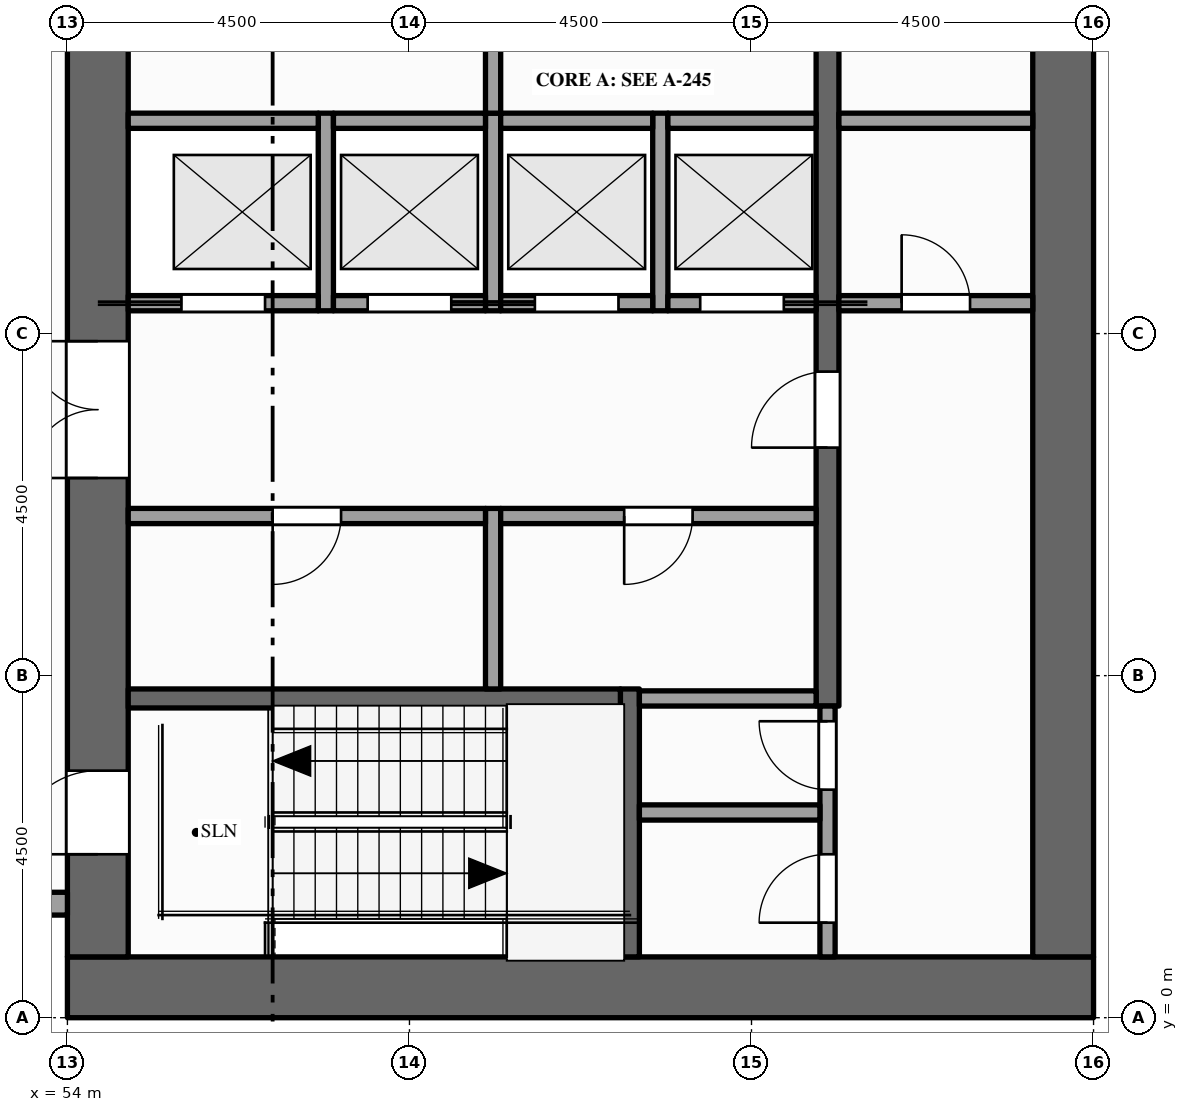
"""IFC4 building model, lengths in metres.
Left out: names, types, materials, properties, quantities, classifications, styles, units other than length and angle.
Written with IfcOpenShell. Run it as: python <this file> out.ifc"""

import sys

from ifc_helpers import new_model, si_unit, direction, frame, frame_2d, origin, place, context, subcontext, project, spatial, rectangle, extrude, element, fill, save


model = new_model("IFC4")
c1 = context("Model", 3, precision=1e-05, world=origin(), true_north=direction((0.0, 1.0)))
c2 = subcontext(c1, "Body", "Model", "MODEL_VIEW")
j1 = project(units=[si_unit("LENGTHUNIT", "METRE"), si_unit("PLANEANGLEUNIT", "RADIAN")], contexts=[c1])
p1 = place(None, origin())
s1 = spatial("IfcSite", under=j1, at=p1, CompositionType="ELEMENT")
p2 = place(p1, origin())
s2 = spatial("IfcBuilding", under=s1, at=p2, CompositionType="ELEMENT")
p3 = place(p2, frame((0.0, 0.0, 249.0)))
s3 = spatial("IfcBuildingStorey", under=s2, at=p3, CompositionType="ELEMENT", Elevation=249.0)
p4 = place(p3, frame((67.5, 0.4, -0.15), z_axis=(0.0, 0.0, 1.0), x_axis=(-1.0, 0.0, 0.0)))
e1 = element("IfcWall", 1, at=p4, inside=s3, PredefinedType="SHEAR", context=c2, shape_type="SweptSolid", body=[
    extrude(rectangle(XDim=13.5, YDim=0.8, at=frame_2d((6.75, 0.0))), origin(), (0.0, 0.0, 1.0), 4.0),
])
p5 = place(p3, frame((54.4, 0.8, -0.15), z_axis=(0.0, 0.0, 1.0), x_axis=(0.0, 1.0, 0.0)))
e2 = element("IfcWall", 2, at=p5, inside=s3, PredefinedType="SHEAR", context=c2, shape_type="SweptSolid", body=[
    extrude(rectangle(XDim=20.9, YDim=0.8, at=frame_2d((10.45, 0.0))), origin(), (0.0, 0.0, 1.0), 4.0),
])
p6 = place(p5, frame((6.3, 0.0, 0.15)))
e3 = element("IfcOpeningElement", 3, at=p6, cuts=e2, PredefinedType="OPENING", context=c2, shape_type="SweptSolid", body=[
    extrude(rectangle(XDim=1.8, YDim=2.1, at=frame_2d((0.9, 1.05))), frame((0.0, 0.41, 0.0), z_axis=(0.0, -1.0, 0.0), x_axis=(1.0, 0.0, 0.0)), (0.0, 0.0, 1.0), 0.82),
])
p7 = place(p5, frame((12.35, 0.0, 0.15)))
e4 = element("IfcOpeningElement", 4, at=p7, cuts=e2, PredefinedType="OPENING", context=c2, shape_type="SweptSolid", body=[
    extrude(rectangle(XDim=1.1, YDim=2.1, at=frame_2d((0.55, 1.05))), frame((0.0, 0.41, 0.0), z_axis=(0.0, -1.0, 0.0), x_axis=(1.0, 0.0, 0.0)), (0.0, 0.0, 1.0), 0.82),
])
p8 = place(p5, frame((1.35, 0.0, 0.15)))
e5 = element("IfcOpeningElement", 5, at=p8, cuts=e2, PredefinedType="OPENING", context=c2, shape_type="SweptSolid", body=[
    extrude(rectangle(XDim=1.1, YDim=2.1, at=frame_2d((0.55, 1.05))), frame((0.0, 0.41, 0.0), z_axis=(0.0, -1.0, 0.0), x_axis=(1.0, 0.0, 0.0)), (0.0, 0.0, 1.0), 0.82),
])
p9 = place(p5, frame((18.55, 0.0, 0.15)))
e6 = element("IfcOpeningElement", 6, at=p9, cuts=e2, PredefinedType="OPENING", context=c2, shape_type="SweptSolid", body=[
    extrude(rectangle(XDim=1.1, YDim=2.1, at=frame_2d((0.55, 1.05))), frame((0.0, 0.41, 0.0), z_axis=(0.0, -1.0, 0.0), x_axis=(1.0, 0.0, 0.0)), (0.0, 0.0, 1.0), 0.82),
])
p10 = place(p3, frame((67.1, 0.8, -0.15), z_axis=(0.0, 0.0, 1.0), x_axis=(0.0, 1.0, 0.0)))
e7 = element("IfcWall", 7, at=p10, inside=s3, PredefinedType="SHEAR", context=c2, shape_type="SweptSolid", body=[
    extrude(rectangle(XDim=20.9, YDim=0.8, at=frame_2d((10.45, 0.0))), origin(), (0.0, 0.0, 1.0), 4.0),
])
p11 = place(p3, frame((49.825, 1.5, 0.0), z_axis=(0.0, 0.0, 1.0), x_axis=(1.0, 0.0, 0.0)))
e8 = element("IfcWall", 8, at=p11, inside=s3, PredefinedType="STANDARD", context=c2, shape_type="SweptSolid", body=[
    extrude(rectangle(XDim=4.175, YDim=0.3, at=frame_2d((2.087, 0.0))), origin(), (0.0, 0.0, 1.0), 2.87),
])
p12 = place(p11, frame((0.413, 0.0, 0.9)))
e9 = element("IfcOpeningElement", 9, at=p12, cuts=e8, PredefinedType="OPENING", context=c2, shape_type="SweptSolid", body=[
    extrude(rectangle(XDim=1.2, YDim=1.75, at=frame_2d((0.6, 0.875))), frame((0.0, 0.16, 0.0), z_axis=(0.0, -1.0, 0.0), x_axis=(1.0, 0.0, 0.0)), (0.0, 0.0, 1.0), 0.32),
])
p13 = place(p11, frame((2.225, 0.0, 0.9)))
e10 = element("IfcOpeningElement", 10, at=p13, cuts=e8, PredefinedType="OPENING", context=c2, shape_type="SweptSolid", body=[
    extrude(rectangle(XDim=1.55, YDim=1.75, at=frame_2d((0.775, 0.875))), frame((0.0, 0.16, 0.0), z_axis=(0.0, -1.0, 0.0), x_axis=(1.0, 0.0, 0.0)), (0.0, 0.0, 1.0), 0.32),
])
p14 = place(p3, frame((57.4, 9.3, 0.0), z_axis=(0.0, 0.0, 1.0), x_axis=(0.0, 1.0, 0.0)))
e11 = element("IfcWall", 11, at=p14, inside=s3, PredefinedType="SOLIDWALL", context=c2, shape_type="SweptSolid", body=[
    extrude(rectangle(XDim=2.6, YDim=0.2, at=frame_2d((1.3, 0.0))), origin(), (0.0, 0.0, 1.0), 3.85),
])
p15 = place(p3, frame((59.6, 4.325, 0.0), z_axis=(0.0, 0.0, 1.0), x_axis=(0.0, 1.0, 0.0)))
e12 = element("IfcWall", 12, at=p15, inside=s3, PredefinedType="PARTITIONING", context=c2, shape_type="SweptSolid", body=[
    extrude(rectangle(XDim=2.375, YDim=0.2, at=frame_2d((1.188, 0.0))), origin(), (0.0, 0.0, 1.0), 3.85),
])
p16 = place(p3, frame((59.6, 9.3, 0.0), z_axis=(0.0, 0.0, 1.0), x_axis=(0.0, 1.0, 0.0)))
e13 = element("IfcWall", 13, at=p16, inside=s3, PredefinedType="SOLIDWALL", context=c2, shape_type="SweptSolid", body=[
    extrude(rectangle(XDim=2.6, YDim=0.2, at=frame_2d((1.3, 0.0))), origin(), (0.0, 0.0, 1.0), 3.85),
])
p17 = place(p3, frame((59.6, 11.9, 0.0), z_axis=(0.0, 0.0, 1.0), x_axis=(0.0, 1.0, 0.0)))
e14 = element("IfcWall", 14, at=p17, inside=s3, PredefinedType="PARTITIONING", context=c2, shape_type="SweptSolid", body=[
    extrude(rectangle(XDim=3.6, YDim=0.2, at=frame_2d((1.8, 0.0))), origin(), (0.0, 0.0, 1.0), 3.85),
])
p18 = place(p17, frame((1.3, 0.0, 0.0)))
e15 = element("IfcOpeningElement", 15, at=p18, cuts=e14, PredefinedType="OPENING", context=c2, shape_type="SweptSolid", body=[
    extrude(rectangle(XDim=1.0, YDim=2.1, at=frame_2d((0.5, 1.05))), frame((0.0, 0.11, 0.0), z_axis=(0.0, -1.0, 0.0), x_axis=(1.0, 0.0, 0.0)), (0.0, 0.0, 1.0), 0.22),
])
p19 = place(p3, frame((61.4, 0.8, 0.0), z_axis=(0.0, 0.0, 1.0), x_axis=(0.0, 1.0, 0.0)))
e16 = element("IfcWall", 16, at=p19, inside=s3, PredefinedType="SHEAR", context=c2, shape_type="SweptSolid", body=[
    extrude(rectangle(XDim=3.525, YDim=0.25, at=frame_2d((1.762, 0.0))), origin(), (0.0, 0.0, 1.0), 3.85),
])
p20 = place(p3, frame((61.8, 9.3, 0.0), z_axis=(0.0, 0.0, 1.0), x_axis=(0.0, 1.0, 0.0)))
e17 = element("IfcWall", 17, at=p20, inside=s3, PredefinedType="SOLIDWALL", context=c2, shape_type="SweptSolid", body=[
    extrude(rectangle(XDim=2.6, YDim=0.2, at=frame_2d((1.3, 0.0))), origin(), (0.0, 0.0, 1.0), 3.85),
])
p21 = place(p3, frame((64.0, 0.8, 0.0), z_axis=(0.0, 0.0, 1.0), x_axis=(0.0, 1.0, 0.0)))
e18 = element("IfcWall", 18, at=p21, inside=s3, PredefinedType="PARTITIONING", context=c2, shape_type="SweptSolid", body=[
    extrude(rectangle(XDim=3.3, YDim=0.2, at=frame_2d((1.65, 0.0))), origin(), (0.0, 0.0, 1.0), 3.85),
])
p22 = place(p21, frame((0.45, 0.0, 0.0)))
e19 = element("IfcOpeningElement", 19, at=p22, cuts=e18, PredefinedType="OPENING", context=c2, shape_type="SweptSolid", body=[
    extrude(rectangle(XDim=0.9, YDim=2.1, at=frame_2d((0.45, 1.05))), frame((0.0, 0.11, 0.0), z_axis=(0.0, -1.0, 0.0), x_axis=(1.0, 0.0, 0.0)), (0.0, 0.0, 1.0), 0.22),
])
p23 = place(p21, frame((2.2, 0.0, 0.0)))
e20 = element("IfcOpeningElement", 20, at=p23, cuts=e18, PredefinedType="OPENING", context=c2, shape_type="SweptSolid", body=[
    extrude(rectangle(XDim=0.9, YDim=2.1, at=frame_2d((0.45, 1.05))), frame((0.0, 0.11, 0.0), z_axis=(0.0, -1.0, 0.0), x_axis=(1.0, 0.0, 0.0)), (0.0, 0.0, 1.0), 0.22),
])
p24 = place(p3, frame((64.0, 4.1, 0.0), z_axis=(0.0, 0.0, 1.0), x_axis=(0.0, 1.0, 0.0)))
e21 = element("IfcWall", 21, at=p24, inside=s3, PredefinedType="SHEAR", context=c2, shape_type="SweptSolid", body=[
    extrude(rectangle(XDim=14.5, YDim=0.3, at=frame_2d((7.25, 0.0))), origin(), (0.0, 0.0, 1.0), 3.85),
])
p25 = place(p24, frame((3.4, 0.0, 0.0)))
e22 = element("IfcOpeningElement", 22, at=p25, cuts=e21, PredefinedType="OPENING", context=c2, shape_type="SweptSolid", body=[
    extrude(rectangle(XDim=1.0, YDim=2.1, at=frame_2d((0.5, 1.05))), frame((0.0, 0.16, 0.0), z_axis=(0.0, -1.0, 0.0), x_axis=(1.0, 0.0, 0.0)), (0.0, 0.0, 1.0), 0.32),
])
p26 = place(p24, frame((9.1, 0.0, 0.0)))
e23 = element("IfcOpeningElement", 23, at=p26, cuts=e21, PredefinedType="OPENING", context=c2, shape_type="SweptSolid", body=[
    extrude(rectangle(XDim=1.0, YDim=2.1, at=frame_2d((0.5, 1.05))), frame((0.0, 0.16, 0.0), z_axis=(0.0, -1.0, 0.0), x_axis=(1.0, 0.0, 0.0)), (0.0, 0.0, 1.0), 0.32),
])
p27 = place(p3, frame((61.525, 2.7, 0.0), z_axis=(0.0, 0.0, 1.0), x_axis=(1.0, 0.0, 0.0)))
e24 = element("IfcWall", 24, at=p27, inside=s3, PredefinedType="PARTITIONING", context=c2, shape_type="SweptSolid", body=[
    extrude(rectangle(XDim=2.375, YDim=0.2, at=frame_2d((1.188, 0.0))), origin(), (0.0, 0.0, 1.0), 3.85),
])
p28 = place(p3, frame((54.8, 4.2, 0.0), z_axis=(0.0, 0.0, 1.0), x_axis=(1.0, 0.0, 0.0)))
e25 = element("IfcWall", 25, at=p28, inside=s3, PredefinedType="SHEAR", context=c2, shape_type="SweptSolid", body=[
    extrude(rectangle(XDim=6.475, YDim=0.25, at=frame_2d((3.237, 0.0))), origin(), (0.0, 0.0, 1.0), 3.85),
])
p29 = place(p3, frame((61.525, 4.2, 0.0), z_axis=(0.0, 0.0, 1.0), x_axis=(1.0, 0.0, 0.0)))
e26 = element("IfcWall", 26, at=p29, inside=s3, PredefinedType="PARTITIONING", context=c2, shape_type="SweptSolid", body=[
    extrude(rectangle(XDim=2.325, YDim=0.2, at=frame_2d((1.163, 0.0))), origin(), (0.0, 0.0, 1.0), 3.85),
])
p30 = place(p3, frame((54.8, 6.6, 0.0), z_axis=(0.0, 0.0, 1.0), x_axis=(1.0, 0.0, 0.0)))
e27 = element("IfcWall", 27, at=p30, inside=s3, PredefinedType="PARTITIONING", context=c2, shape_type="SweptSolid", body=[
    extrude(rectangle(XDim=4.7, YDim=0.2, at=frame_2d((2.35, 0.0))), origin(), (0.0, 0.0, 1.0), 3.85),
])
p31 = place(p30, frame((1.9, 0.0, 0.0)))
e28 = element("IfcOpeningElement", 28, at=p31, cuts=e27, PredefinedType="OPENING", context=c2, shape_type="SweptSolid", body=[
    extrude(rectangle(XDim=0.9, YDim=2.1, at=frame_2d((0.45, 1.05))), frame((0.0, 0.11, 0.0), z_axis=(0.0, -1.0, 0.0), x_axis=(1.0, 0.0, 0.0)), (0.0, 0.0, 1.0), 0.22),
])
p32 = place(p3, frame((59.7, 6.6, 0.0), z_axis=(0.0, 0.0, 1.0), x_axis=(1.0, 0.0, 0.0)))
e29 = element("IfcWall", 29, at=p32, inside=s3, PredefinedType="PARTITIONING", context=c2, shape_type="SweptSolid", body=[
    extrude(rectangle(XDim=4.15, YDim=0.2, at=frame_2d((2.075, 0.0))), origin(), (0.0, 0.0, 1.0), 3.85),
])
p33 = place(p32, frame((1.625, 0.0, 0.0)))
e30 = element("IfcOpeningElement", 30, at=p33, cuts=e29, PredefinedType="OPENING", context=c2, shape_type="SweptSolid", body=[
    extrude(rectangle(XDim=0.9, YDim=2.1, at=frame_2d((0.45, 1.05))), frame((0.0, 0.11, 0.0), z_axis=(0.0, -1.0, 0.0), x_axis=(1.0, 0.0, 0.0)), (0.0, 0.0, 1.0), 0.22),
])
p34 = place(p3, frame((54.8, 9.4, 0.0), z_axis=(0.0, 0.0, 1.0), x_axis=(1.0, 0.0, 0.0)))
e31 = element("IfcWall", 31, at=p34, inside=s3, PredefinedType="SOLIDWALL", context=c2, shape_type="SweptSolid", body=[
    extrude(rectangle(XDim=2.5, YDim=0.2, at=frame_2d((1.25, 0.0))), origin(), (0.0, 0.0, 1.0), 3.85),
])
p35 = place(p34, frame((0.7, 0.0, 0.012)))
e32 = element("IfcOpeningElement", 32, at=p35, cuts=e31, PredefinedType="OPENING", context=c2, shape_type="SweptSolid", body=[
    extrude(rectangle(XDim=1.1, YDim=2.1, at=frame_2d((0.55, 1.05))), frame((0.0, 0.11, 0.0), z_axis=(0.0, -1.0, 0.0), x_axis=(1.0, 0.0, 0.0)), (0.0, 0.0, 1.0), 0.22),
])
p36 = place(p3, frame((57.5, 9.4, 0.0), z_axis=(0.0, 0.0, 1.0), x_axis=(1.0, 0.0, 0.0)))
e33 = element("IfcWall", 33, at=p36, inside=s3, PredefinedType="SOLIDWALL", context=c2, shape_type="SweptSolid", body=[
    extrude(rectangle(XDim=2.0, YDim=0.2, at=frame_2d((1.0, 0.0))), origin(), (0.0, 0.0, 1.0), 3.85),
])
p37 = place(p36, frame((0.45, 0.0, 0.012)))
e34 = element("IfcOpeningElement", 34, at=p37, cuts=e33, PredefinedType="OPENING", context=c2, shape_type="SweptSolid", body=[
    extrude(rectangle(XDim=1.1, YDim=2.1, at=frame_2d((0.55, 1.05))), frame((0.0, 0.11, 0.0), z_axis=(0.0, -1.0, 0.0), x_axis=(1.0, 0.0, 0.0)), (0.0, 0.0, 1.0), 0.22),
])
p38 = place(p3, frame((59.7, 9.4, 0.0), z_axis=(0.0, 0.0, 1.0), x_axis=(1.0, 0.0, 0.0)))
e35 = element("IfcWall", 35, at=p38, inside=s3, PredefinedType="SOLIDWALL", context=c2, shape_type="SweptSolid", body=[
    extrude(rectangle(XDim=2.0, YDim=0.2, at=frame_2d((1.0, 0.0))), origin(), (0.0, 0.0, 1.0), 3.85),
])
p39 = place(p38, frame((0.45, 0.0, 0.012)))
e36 = element("IfcOpeningElement", 36, at=p39, cuts=e35, PredefinedType="OPENING", context=c2, shape_type="SweptSolid", body=[
    extrude(rectangle(XDim=1.1, YDim=2.1, at=frame_2d((0.55, 1.05))), frame((0.0, 0.11, 0.0), z_axis=(0.0, -1.0, 0.0), x_axis=(1.0, 0.0, 0.0)), (0.0, 0.0, 1.0), 0.22),
])
p40 = place(p3, frame((61.9, 9.4, 0.0), z_axis=(0.0, 0.0, 1.0), x_axis=(1.0, 0.0, 0.0)))
e37 = element("IfcWall", 37, at=p40, inside=s3, PredefinedType="SOLIDWALL", context=c2, shape_type="SweptSolid", body=[
    extrude(rectangle(XDim=1.95, YDim=0.2, at=frame_2d((0.975, 0.0))), origin(), (0.0, 0.0, 1.0), 3.85),
])
p41 = place(p40, frame((0.425, 0.0, 0.012)))
e38 = element("IfcOpeningElement", 38, at=p41, cuts=e37, PredefinedType="OPENING", context=c2, shape_type="SweptSolid", body=[
    extrude(rectangle(XDim=1.1, YDim=2.1, at=frame_2d((0.55, 1.05))), frame((0.0, 0.11, 0.0), z_axis=(0.0, -1.0, 0.0), x_axis=(1.0, 0.0, 0.0)), (0.0, 0.0, 1.0), 0.22),
])
p42 = place(p3, frame((64.15, 9.4, 0.0), z_axis=(0.0, 0.0, 1.0), x_axis=(1.0, 0.0, 0.0)))
e39 = element("IfcWall", 39, at=p42, inside=s3, PredefinedType="PARTITIONING", context=c2, shape_type="SweptSolid", body=[
    extrude(rectangle(XDim=2.55, YDim=0.2, at=frame_2d((1.275, 0.0))), origin(), (0.0, 0.0, 1.0), 3.85),
])
p43 = place(p42, frame((0.825, 0.0, 0.0)))
e40 = element("IfcOpeningElement", 40, at=p43, cuts=e39, PredefinedType="OPENING", context=c2, shape_type="SweptSolid", body=[
    extrude(rectangle(XDim=0.9, YDim=2.1, at=frame_2d((0.45, 1.05))), frame((0.0, 0.11, 0.0), z_axis=(0.0, -1.0, 0.0), x_axis=(1.0, 0.0, 0.0)), (0.0, 0.0, 1.0), 0.22),
])
p44 = place(p3, frame((54.8, 11.8, 0.0), z_axis=(0.0, 0.0, 1.0), x_axis=(1.0, 0.0, 0.0)))
e41 = element("IfcWall", 41, at=p44, inside=s3, PredefinedType="SOLIDWALL", context=c2, shape_type="SweptSolid", body=[
    extrude(rectangle(XDim=2.5, YDim=0.2, at=frame_2d((1.25, 0.0))), origin(), (0.0, 0.0, 1.0), 3.85),
])
for number, where, z_axis, x_axis in (
    (42, (57.5, 11.8, 0.0), (0.0, 0.0, 1.0), (1.0, 0.0, 0.0)),
    (43, (59.7, 11.8, 0.0), (0.0, 0.0, 1.0), (1.0, 0.0, 0.0)),
):
    element("IfcWall", number, at=place(p3, frame(where, z_axis=z_axis, x_axis=x_axis)), inside=s3, PredefinedType="SOLIDWALL", context=c2, shape_type="SweptSolid", body=[
        extrude(rectangle(XDim=2.0, YDim=0.2, at=frame_2d((1.0, 0.0))), origin(), (0.0, 0.0, 1.0), 3.85),
    ])
p45 = place(p3, frame((61.9, 11.8, 0.0), z_axis=(0.0, 0.0, 1.0), x_axis=(1.0, 0.0, 0.0)))
e44 = element("IfcWall", 44, at=p45, inside=s3, PredefinedType="SOLIDWALL", context=c2, shape_type="SweptSolid", body=[
    extrude(rectangle(XDim=1.95, YDim=0.2, at=frame_2d((0.975, 0.0))), origin(), (0.0, 0.0, 1.0), 3.85),
])
p46 = place(p3, frame((64.15, 11.8, 0.0), z_axis=(0.0, 0.0, 1.0), x_axis=(1.0, 0.0, 0.0)))
e45 = element("IfcWall", 45, at=p46, inside=s3, PredefinedType="PARTITIONING", context=c2, shape_type="SweptSolid", body=[
    extrude(rectangle(XDim=2.55, YDim=0.2, at=frame_2d((1.275, 0.0))), origin(), (0.0, 0.0, 1.0), 3.85),
])
p47 = place(p35, origin())
e46 = element("IfcDoor", 46, at=p47, inside=s3, OperationType="SLIDING_TO_LEFT", PredefinedType="DOOR", context=c2, shape_type="SweptSolid", body=[
    extrude(rectangle(XDim=1.1, YDim=2.1, at=frame_2d((0.55, 1.05))), frame((0.0, 0.025, 0.0), z_axis=(0.0, -1.0, 0.0), x_axis=(1.0, 0.0, 0.0)), (0.0, 0.0, 1.0), 0.05),
])
fill(e32, e46)
p48 = place(p37, origin())
e47 = element("IfcDoor", 47, at=p48, inside=s3, OperationType="SLIDING_TO_RIGHT", PredefinedType="DOOR", context=c2, shape_type="SweptSolid", body=[
    extrude(rectangle(XDim=1.1, YDim=2.1, at=frame_2d((0.55, 1.05))), frame((0.0, 0.025, 0.0), z_axis=(0.0, -1.0, 0.0), x_axis=(1.0, 0.0, 0.0)), (0.0, 0.0, 1.0), 0.05),
])
fill(e34, e47)
p49 = place(p39, origin())
e48 = element("IfcDoor", 48, at=p49, inside=s3, OperationType="SLIDING_TO_LEFT", PredefinedType="DOOR", context=c2, shape_type="SweptSolid", body=[
    extrude(rectangle(XDim=1.1, YDim=2.1, at=frame_2d((0.55, 1.05))), frame((0.0, 0.025, 0.0), z_axis=(0.0, -1.0, 0.0), x_axis=(1.0, 0.0, 0.0)), (0.0, 0.0, 1.0), 0.05),
])
fill(e36, e48)
p50 = place(p41, origin())
e49 = element("IfcDoor", 49, at=p50, inside=s3, OperationType="SLIDING_TO_RIGHT", PredefinedType="DOOR", context=c2, shape_type="SweptSolid", body=[
    extrude(rectangle(XDim=1.1, YDim=2.1, at=frame_2d((0.55, 1.05))), frame((0.0, 0.025, 0.0), z_axis=(0.0, -1.0, 0.0), x_axis=(1.0, 0.0, 0.0)), (0.0, 0.0, 1.0), 0.05),
])
fill(e38, e49)
p51 = place(p6, origin())
e50 = element("IfcDoor", 50, at=p51, inside=s3, OperationType="DOUBLE_DOOR_SINGLE_SWING", PredefinedType="DOOR", context=c2, shape_type="SweptSolid", body=[
    extrude(rectangle(XDim=1.8, YDim=2.1, at=frame_2d((0.9, 1.05))), frame((0.0, 0.025, 0.0), z_axis=(0.0, -1.0, 0.0), x_axis=(1.0, 0.0, 0.0)), (0.0, 0.0, 1.0), 0.05),
])
fill(e3, e50)
p52 = place(p25, origin())
e51 = element("IfcDoor", 51, at=p52, inside=s3, OperationType="SINGLE_SWING_LEFT", PredefinedType="DOOR", context=c2, shape_type="SweptSolid", body=[
    extrude(rectangle(XDim=1.0, YDim=2.1, at=frame_2d((0.5, 1.05))), frame((0.0, 0.025, 0.0), z_axis=(0.0, -1.0, 0.0), x_axis=(1.0, 0.0, 0.0)), (0.0, 0.0, 1.0), 0.05),
])
fill(e22, e51)
p53 = place(p43, origin())
e52 = element("IfcDoor", 52, at=p53, inside=s3, OperationType="SINGLE_SWING_LEFT", PredefinedType="DOOR", context=c2, shape_type="SweptSolid", body=[
    extrude(rectangle(XDim=0.9, YDim=2.1, at=frame_2d((0.45, 1.05))), frame((0.0, 0.025, 0.0), z_axis=(0.0, -1.0, 0.0), x_axis=(1.0, 0.0, 0.0)), (0.0, 0.0, 1.0), 0.05),
])
fill(e40, e52)
p54 = place(p8, origin())
e53 = element("IfcDoor", 53, at=p54, inside=s3, OperationType="SINGLE_SWING_LEFT", PredefinedType="DOOR", context=c2, shape_type="SweptSolid", body=[
    extrude(rectangle(XDim=1.1, YDim=2.1, at=frame_2d((0.55, 1.05))), frame((0.0, 0.025, 0.0), z_axis=(0.0, -1.0, 0.0), x_axis=(1.0, 0.0, 0.0)), (0.0, 0.0, 1.0), 0.05),
])
fill(e5, e53)
p55 = place(p22, origin())
e54 = element("IfcDoor", 54, at=p55, inside=s3, OperationType="SINGLE_SWING_LEFT", PredefinedType="DOOR", context=c2, shape_type="SweptSolid", body=[
    extrude(rectangle(XDim=0.9, YDim=2.1, at=frame_2d((0.45, 1.05))), frame((0.0, 0.025, 0.0), z_axis=(0.0, -1.0, 0.0), x_axis=(1.0, 0.0, 0.0)), (0.0, 0.0, 1.0), 0.05),
])
fill(e19, e54)
p56 = place(p23, origin())
e55 = element("IfcDoor", 55, at=p56, inside=s3, OperationType="SINGLE_SWING_RIGHT", PredefinedType="DOOR", context=c2, shape_type="SweptSolid", body=[
    extrude(rectangle(XDim=0.9, YDim=2.1, at=frame_2d((0.45, 1.05))), frame((0.0, 0.025, 0.0), z_axis=(0.0, -1.0, 0.0), x_axis=(1.0, 0.0, 0.0)), (0.0, 0.0, 1.0), 0.05),
])
fill(e20, e55)
p57 = place(p31, origin())
e56 = element("IfcDoor", 56, at=p57, inside=s3, OperationType="SINGLE_SWING_LEFT", PredefinedType="DOOR", context=c2, shape_type="SweptSolid", body=[
    extrude(rectangle(XDim=0.9, YDim=2.1, at=frame_2d((0.45, 1.05))), frame((0.0, 0.025, 0.0), z_axis=(0.0, -1.0, 0.0), x_axis=(1.0, 0.0, 0.0)), (0.0, 0.0, 1.0), 0.05),
])
fill(e28, e56)
p58 = place(p33, origin())
e57 = element("IfcDoor", 57, at=p58, inside=s3, OperationType="SINGLE_SWING_LEFT", PredefinedType="DOOR", context=c2, shape_type="SweptSolid", body=[
    extrude(rectangle(XDim=0.9, YDim=2.1, at=frame_2d((0.45, 1.05))), frame((0.0, 0.025, 0.0), z_axis=(0.0, -1.0, 0.0), x_axis=(1.0, 0.0, 0.0)), (0.0, 0.0, 1.0), 0.05),
])
fill(e30, e57)
save(model, sys.argv[1])
